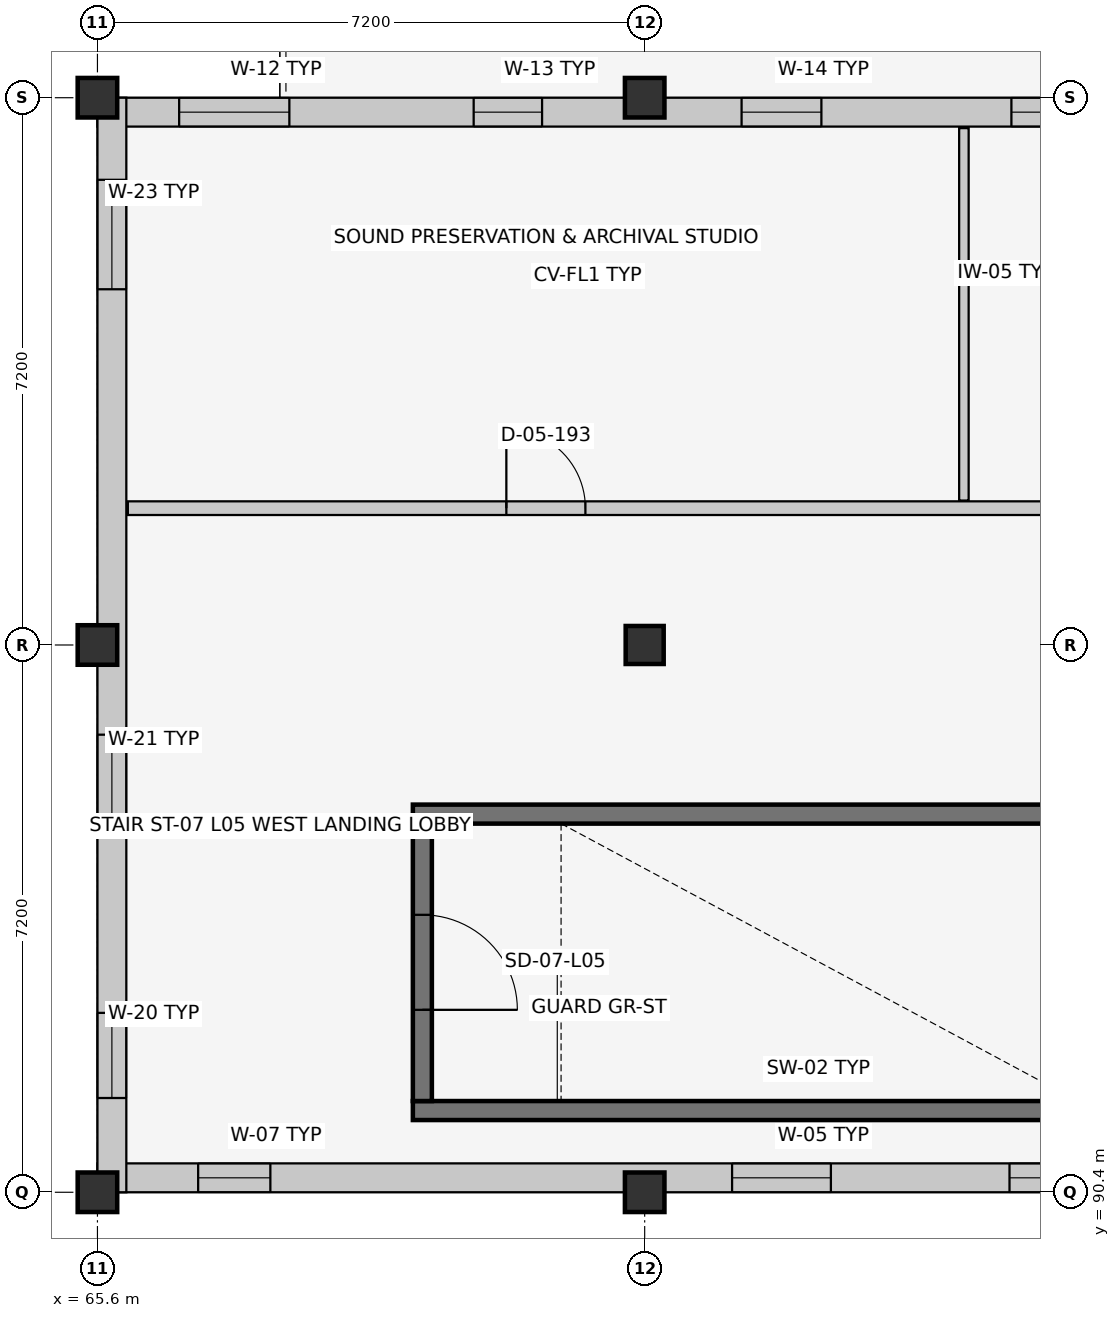
"""IFC4 building model, lengths in metres.
Left out: names, types, materials, properties, quantities, classifications, styles, units other than length and angle.
Written with IfcOpenShell. Run it as: python <this file> out.ifc"""

import sys

from ifc_helpers import new_model, si_unit, direction, frame, frame_2d, origin, origin_2d, place, context, subcontext, project, spatial, rectangle, extrude, element, fill, save


model = new_model("IFC4")
c1 = context("Model", 3, precision=1e-05, world=origin(), true_north=direction((0.0, 1.0)))
c2 = subcontext(c1, "Body", "Model", "MODEL_VIEW")
j1 = project(units=[si_unit("LENGTHUNIT", "METRE"), si_unit("PLANEANGLEUNIT", "RADIAN")], contexts=[c1])
p1 = place(None, origin())
s1 = spatial("IfcSite", under=j1, at=p1, CompositionType="ELEMENT")
p2 = place(p1, origin())
s2 = spatial("IfcBuilding", under=s1, at=p2, CompositionType="ELEMENT")
p3 = place(p2, frame((0.0, 0.0, 21.9)))
s3 = spatial("IfcBuildingStorey", under=s2, at=p3, CompositionType="ELEMENT", Elevation=21.9)
for number, where, z_axis, x_axis in (
    (1, (65.6, 90.4, 0.0), (0.0, 0.0, 1.0), (1.0, 0.0, 0.0)),
    (2, (65.6, 97.6, 0.0), (0.0, 0.0, 1.0), (1.0, 0.0, 0.0)),
    (3, (65.6, 104.8, 0.0), (0.0, 0.0, 1.0), (1.0, 0.0, 0.0)),
    (4, (72.8, 90.4, 0.0), (0.0, 0.0, 1.0), (1.0, 0.0, 0.0)),
):
    element("IfcColumn", number, at=place(p3, frame(where, z_axis=z_axis, x_axis=x_axis)), inside=s3, PredefinedType="COLUMN", context=c2, shape_type="SweptSolid", body=[
        extrude(rectangle(XDim=0.52, YDim=0.52, at=origin_2d()), origin(), (0.0, 0.0, 1.0), 3.9),
    ])
p4 = place(p3, frame((72.8, 97.6, 0.0), z_axis=(0.0, 0.0, 1.0), x_axis=(1.0, 0.0, 0.0)))
e5 = element("IfcColumn", 5, at=p4, inside=s3, PredefinedType="COLUMN", context=c2, shape_type="SweptSolid", body=[
    extrude(rectangle(XDim=0.5, YDim=0.5, at=origin_2d()), origin(), (0.0, 0.0, 1.0), 3.9),
])
p5 = place(p3, frame((72.8, 104.8, 0.0), z_axis=(0.0, 0.0, 1.0), x_axis=(1.0, 0.0, 0.0)))
e6 = element("IfcColumn", 6, at=p5, inside=s3, PredefinedType="COLUMN", context=c2, shape_type="SweptSolid", body=[
    extrude(rectangle(XDim=0.52, YDim=0.52, at=origin_2d()), origin(), (0.0, 0.0, 1.0), 3.9),
])
p6 = place(p3, frame((94.4, 90.59, 0.0), z_axis=(0.0, 0.0, 1.0), x_axis=(-1.0, 0.0, 0.0)))
e7 = element("IfcWall", 7, at=p6, inside=s3, PredefinedType="SOLIDWALL", context=c2, shape_type="SweptSolid", body=[
    extrude(rectangle(XDim=28.8, YDim=0.38, at=frame_2d((14.4, 0.0))), origin(), (0.0, 0.0, 1.0), 2.955),
])
p7 = place(p6, frame((1.05, 0.0, 0.9)))
e8 = element("IfcOpeningElement", 8, at=p7, cuts=e7, PredefinedType="OPENING", context=c2, shape_type="SweptSolid", body=[
    extrude(rectangle(XDim=1.5, YDim=1.75, at=frame_2d((0.75, 0.875))), frame((0.0, 0.202, 0.0), z_axis=(0.0, -1.0, 0.0), x_axis=(1.0, 0.0, 0.0)), (0.0, 0.0, 1.0), 0.404),
])
p8 = place(p6, frame((4.95, 0.0, 0.9)))
e9 = element("IfcOpeningElement", 9, at=p8, cuts=e7, PredefinedType="OPENING", context=c2, shape_type="SweptSolid", body=[
    extrude(rectangle(XDim=0.9, YDim=1.35, at=frame_2d((0.45, 0.675))), frame((0.0, 0.202, 0.0), z_axis=(0.0, -1.0, 0.0), x_axis=(1.0, 0.0, 0.0)), (0.0, 0.0, 1.0), 0.404),
])
p9 = place(p6, frame((8.5, 0.0, 0.9)))
e10 = element("IfcOpeningElement", 10, at=p9, cuts=e7, PredefinedType="OPENING", context=c2, shape_type="SweptSolid", body=[
    extrude(rectangle(XDim=1.0, YDim=1.35, at=frame_2d((0.5, 0.675))), frame((0.0, 0.202, 0.0), z_axis=(0.0, -1.0, 0.0), x_axis=(1.0, 0.0, 0.0)), (0.0, 0.0, 1.0), 0.404),
])
p10 = place(p6, frame((12.05, 0.0, 0.9)))
e11 = element("IfcOpeningElement", 11, at=p10, cuts=e7, PredefinedType="OPENING", context=c2, shape_type="SweptSolid", body=[
    extrude(rectangle(XDim=1.1, YDim=1.35, at=frame_2d((0.55, 0.675))), frame((0.0, 0.202, 0.0), z_axis=(0.0, -1.0, 0.0), x_axis=(1.0, 0.0, 0.0)), (0.0, 0.0, 1.0), 0.404),
])
p11 = place(p6, frame((15.6, 0.0, 0.9)))
e12 = element("IfcOpeningElement", 12, at=p11, cuts=e7, PredefinedType="OPENING", context=c2, shape_type="SweptSolid", body=[
    extrude(rectangle(XDim=1.2, YDim=1.35, at=frame_2d((0.6, 0.675))), frame((0.0, 0.202, 0.0), z_axis=(0.0, -1.0, 0.0), x_axis=(1.0, 0.0, 0.0)), (0.0, 0.0, 1.0), 0.404),
])
p12 = place(p6, frame((19.15, 0.0, 0.9)))
e13 = element("IfcOpeningElement", 13, at=p12, cuts=e7, PredefinedType="OPENING", context=c2, shape_type="SweptSolid", body=[
    extrude(rectangle(XDim=1.3, YDim=1.35, at=frame_2d((0.65, 0.675))), frame((0.0, 0.202, 0.0), z_axis=(0.0, -1.0, 0.0), x_axis=(1.0, 0.0, 0.0)), (0.0, 0.0, 1.0), 0.404),
])
p13 = place(p6, frame((26.525, 0.0, 0.9)))
e14 = element("IfcOpeningElement", 14, at=p13, cuts=e7, PredefinedType="OPENING", context=c2, shape_type="SweptSolid", body=[
    extrude(rectangle(XDim=0.95, YDim=1.45, at=frame_2d((0.475, 0.725))), frame((0.0, 0.202, 0.0), z_axis=(0.0, -1.0, 0.0), x_axis=(1.0, 0.0, 0.0)), (0.0, 0.0, 1.0), 0.404),
])
p14 = place(p3, frame((65.6, 104.61, 0.0), z_axis=(0.0, 0.0, 1.0), x_axis=(1.0, 0.0, 0.0)))
e15 = element("IfcWall", 15, at=p14, inside=s3, PredefinedType="SOLIDWALL", context=c2, shape_type="SweptSolid", body=[
    extrude(rectangle(XDim=28.8, YDim=0.38, at=frame_2d((14.4, 0.0))), origin(), (0.0, 0.0, 1.0), 2.955),
])
p15 = place(p14, frame((17.2, 0.0, 0.0)))
e16 = element("IfcOpeningElement", 16, at=p15, cuts=e15, PredefinedType="OPENING", context=c2, shape_type="SweptSolid", body=[
    extrude(rectangle(XDim=1.6, YDim=2.2, at=frame_2d((0.8, 1.1))), frame((0.0, 0.202, 0.0), z_axis=(0.0, -1.0, 0.0), x_axis=(1.0, 0.0, 0.0)), (0.0, 0.0, 1.0), 0.404),
])
p16 = place(p14, frame((1.075, 0.0, 0.9)))
e17 = element("IfcOpeningElement", 17, at=p16, cuts=e15, PredefinedType="OPENING", context=c2, shape_type="SweptSolid", body=[
    extrude(rectangle(XDim=1.45, YDim=1.45, at=frame_2d((0.725, 0.725))), frame((0.0, 0.202, 0.0), z_axis=(0.0, -1.0, 0.0), x_axis=(1.0, 0.0, 0.0)), (0.0, 0.0, 1.0), 0.404),
])
p17 = place(p14, frame((4.95, 0.0, 0.9)))
e18 = element("IfcOpeningElement", 18, at=p17, cuts=e15, PredefinedType="OPENING", context=c2, shape_type="SweptSolid", body=[
    extrude(rectangle(XDim=0.9, YDim=1.6, at=frame_2d((0.45, 0.8))), frame((0.0, 0.202, 0.0), z_axis=(0.0, -1.0, 0.0), x_axis=(1.0, 0.0, 0.0)), (0.0, 0.0, 1.0), 0.404),
])
p18 = place(p14, frame((8.475, 0.0, 0.9)))
e19 = element("IfcOpeningElement", 19, at=p18, cuts=e15, PredefinedType="OPENING", context=c2, shape_type="SweptSolid", body=[
    extrude(rectangle(XDim=1.05, YDim=1.6, at=frame_2d((0.525, 0.8))), frame((0.0, 0.202, 0.0), z_axis=(0.0, -1.0, 0.0), x_axis=(1.0, 0.0, 0.0)), (0.0, 0.0, 1.0), 0.404),
])
p19 = place(p14, frame((12.025, 0.0, 0.9)))
e20 = element("IfcOpeningElement", 20, at=p19, cuts=e15, PredefinedType="OPENING", context=c2, shape_type="SweptSolid", body=[
    extrude(rectangle(XDim=1.15, YDim=1.6, at=frame_2d((0.575, 0.8))), frame((0.0, 0.202, 0.0), z_axis=(0.0, -1.0, 0.0), x_axis=(1.0, 0.0, 0.0)), (0.0, 0.0, 1.0), 0.404),
])
p20 = place(p14, frame((22.65, 0.0, 0.9)))
e21 = element("IfcOpeningElement", 21, at=p20, cuts=e15, PredefinedType="OPENING", context=c2, shape_type="SweptSolid", body=[
    extrude(rectangle(XDim=1.5, YDim=1.6, at=frame_2d((0.75, 0.8))), frame((0.0, 0.202, 0.0), z_axis=(0.0, -1.0, 0.0), x_axis=(1.0, 0.0, 0.0)), (0.0, 0.0, 1.0), 0.404),
])
p21 = place(p14, frame((26.5, 0.0, 0.9)))
e22 = element("IfcOpeningElement", 22, at=p21, cuts=e15, PredefinedType="OPENING", context=c2, shape_type="SweptSolid", body=[
    extrude(rectangle(XDim=1.0, YDim=1.75, at=frame_2d((0.5, 0.875))), frame((0.0, 0.202, 0.0), z_axis=(0.0, -1.0, 0.0), x_axis=(1.0, 0.0, 0.0)), (0.0, 0.0, 1.0), 0.404),
])
p22 = place(p3, frame((65.79, 90.4, 0.0), z_axis=(0.0, 0.0, 1.0), x_axis=(0.0, 1.0, 0.0)))
e23 = element("IfcWall", 23, at=p22, inside=s3, PredefinedType="SOLIDWALL", context=c2, shape_type="SweptSolid", body=[
    extrude(rectangle(XDim=14.4, YDim=0.38, at=frame_2d((7.2, 0.0))), origin(), (0.0, 0.0, 1.0), 2.915),
])
p23 = place(p22, frame((1.24, 0.0, 0.9)))
e24 = element("IfcOpeningElement", 24, at=p23, cuts=e23, PredefinedType="OPENING", context=c2, shape_type="SweptSolid", body=[
    extrude(rectangle(XDim=1.12, YDim=1.75, at=frame_2d((0.56, 0.875))), frame((0.0, 0.202, 0.0), z_axis=(0.0, -1.0, 0.0), x_axis=(1.0, 0.0, 0.0)), (0.0, 0.0, 1.0), 0.404),
])
p24 = place(p22, frame((4.78, 0.0, 0.9)))
e25 = element("IfcOpeningElement", 25, at=p24, cuts=e23, PredefinedType="OPENING", context=c2, shape_type="SweptSolid", body=[
    extrude(rectangle(XDim=1.24, YDim=1.75, at=frame_2d((0.62, 0.875))), frame((0.0, 0.202, 0.0), z_axis=(0.0, -1.0, 0.0), x_axis=(1.0, 0.0, 0.0)), (0.0, 0.0, 1.0), 0.404),
])
p25 = place(p22, frame((11.88, 0.0, 0.9)))
e26 = element("IfcOpeningElement", 26, at=p25, cuts=e23, PredefinedType="OPENING", context=c2, shape_type="SweptSolid", body=[
    extrude(rectangle(XDim=1.44, YDim=1.75, at=frame_2d((0.72, 0.875))), frame((0.0, 0.202, 0.0), z_axis=(0.0, -1.0, 0.0), x_axis=(1.0, 0.0, 0.0)), (0.0, 0.0, 1.0), 0.404),
])
p26 = place(p3, frame((69.75, 91.475, 0.0), z_axis=(0.0, 0.0, 1.0), x_axis=(1.0, 0.0, 0.0)))
e27 = element("IfcWall", 27, at=p26, inside=s3, PredefinedType="SHEAR", context=c2, shape_type="SweptSolid", body=[
    extrude(rectangle(XDim=9.57, YDim=0.25, at=frame_2d((4.785, 0.0))), origin(), (0.0, 0.0, 1.0), 3.66),
])
p27 = place(p3, frame((78.75, 95.375, 0.0), z_axis=(0.0, 0.0, 1.0), x_axis=(-1.0, 0.0, 0.0)))
e28 = element("IfcWall", 28, at=p27, inside=s3, PredefinedType="SHEAR", context=c2, shape_type="SweptSolid", body=[
    extrude(rectangle(XDim=9.0, YDim=0.25, at=frame_2d((4.5, 0.0))), origin(), (0.0, 0.0, 1.0), 3.66),
])
p28 = place(p3, frame((69.875, 95.25, 0.0), z_axis=(0.0, 0.0, 1.0), x_axis=(0.0, -1.0, 0.0)))
e29 = element("IfcWall", 29, at=p28, inside=s3, PredefinedType="SHEAR", context=c2, shape_type="SweptSolid", body=[
    extrude(rectangle(XDim=3.65, YDim=0.25, at=frame_2d((1.825, 0.0))), origin(), (0.0, 0.0, 1.0), 3.66),
])
p29 = place(p28, frame((1.2, 0.0, 0.0)))
e30 = element("IfcOpeningElement", 30, at=p29, cuts=e29, PredefinedType="OPENING", context=c2, shape_type="SweptSolid", body=[
    extrude(rectangle(XDim=1.25, YDim=2.15, at=frame_2d((0.625, 1.075))), frame((0.0, 0.137, 0.0), z_axis=(0.0, -1.0, 0.0), x_axis=(1.0, 0.0, 0.0)), (0.0, 0.0, 1.0), 0.274),
])
p30 = place(p3, frame((66.0, 99.4, 0.0), z_axis=(0.0, 0.0, 1.0), x_axis=(1.0, 0.0, 0.0)))
e31 = element("IfcWall", 31, at=p30, inside=s3, PredefinedType="PARTITIONING", context=c2, shape_type="SweptSolid", body=[
    extrude(rectangle(XDim=28.0, YDim=0.18, at=frame_2d((14.0, 0.0))), origin(), (0.0, 0.0, 1.0), 3.66),
])
p31 = place(p30, frame((4.98, 0.0, 0.0)))
e32 = element("IfcOpeningElement", 32, at=p31, cuts=e31, PredefinedType="OPENING", context=c2, shape_type="SweptSolid", body=[
    extrude(rectangle(XDim=1.04, YDim=2.15, at=frame_2d((0.52, 1.075))), frame((0.0, 0.102, 0.0), z_axis=(0.0, -1.0, 0.0), x_axis=(1.0, 0.0, 0.0)), (0.0, 0.0, 1.0), 0.204),
])
p32 = place(p30, frame((14.49, 0.0, 0.0)))
e33 = element("IfcOpeningElement", 33, at=p32, cuts=e31, PredefinedType="OPENING", context=c2, shape_type="SweptSolid", body=[
    extrude(rectangle(XDim=1.02, YDim=2.12, at=frame_2d((0.51, 1.06))), frame((0.0, 0.102, 0.0), z_axis=(0.0, -1.0, 0.0), x_axis=(1.0, 0.0, 0.0)), (0.0, 0.0, 1.0), 0.204),
])
p33 = place(p30, frame((23.01, 0.0, 0.0)))
e34 = element("IfcOpeningElement", 34, at=p33, cuts=e31, PredefinedType="OPENING", context=c2, shape_type="SweptSolid", body=[
    extrude(rectangle(XDim=0.98, YDim=2.12, at=frame_2d((0.49, 1.06))), frame((0.0, 0.102, 0.0), z_axis=(0.0, -1.0, 0.0), x_axis=(1.0, 0.0, 0.0)), (0.0, 0.0, 1.0), 0.204),
])
p34 = place(p3, frame((77.0, 99.5, 0.0), z_axis=(0.0, 0.0, 1.0), x_axis=(0.0, 1.0, 0.0)))
e35 = element("IfcWall", 35, at=p34, inside=s3, PredefinedType="PARTITIONING", context=c2, shape_type="SweptSolid", body=[
    extrude(rectangle(XDim=4.9, YDim=0.125, at=frame_2d((2.45, 0.0))), origin(), (0.0, 0.0, 1.0), 3.66),
])
p35 = place(p11, origin())
e36 = element("IfcWindow", 36, at=p35, inside=s3, PartitioningType="SINGLE_PANEL", PredefinedType="WINDOW", context=c2, shape_type="SweptSolid", body=[
    extrude(rectangle(XDim=1.2, YDim=1.35, at=frame_2d((0.6, 0.675))), frame((0.0, 0.03, 0.0), z_axis=(0.0, -1.0, 0.0), x_axis=(1.0, 0.0, 0.0)), (0.0, 0.0, 1.0), 0.06),
])
fill(e12, e36)
p36 = place(p12, origin())
e37 = element("IfcWindow", 37, at=p36, inside=s3, PartitioningType="SINGLE_PANEL", PredefinedType="WINDOW", context=c2, shape_type="SweptSolid", body=[
    extrude(rectangle(XDim=1.3, YDim=1.35, at=frame_2d((0.65, 0.675))), frame((0.0, 0.03, 0.0), z_axis=(0.0, -1.0, 0.0), x_axis=(1.0, 0.0, 0.0)), (0.0, 0.0, 1.0), 0.06),
])
fill(e13, e37)
p37 = place(p13, origin())
e38 = element("IfcWindow", 38, at=p37, inside=s3, PartitioningType="SINGLE_PANEL", PredefinedType="WINDOW", context=c2, shape_type="SweptSolid", body=[
    extrude(rectangle(XDim=0.95, YDim=1.45, at=frame_2d((0.475, 0.725))), frame((0.0, 0.03, 0.0), z_axis=(0.0, -1.0, 0.0), x_axis=(1.0, 0.0, 0.0)), (0.0, 0.0, 1.0), 0.06),
])
fill(e14, e38)
p38 = place(p16, origin())
e39 = element("IfcWindow", 39, at=p38, inside=s3, PartitioningType="SINGLE_PANEL", PredefinedType="WINDOW", context=c2, shape_type="SweptSolid", body=[
    extrude(rectangle(XDim=1.45, YDim=1.45, at=frame_2d((0.725, 0.725))), frame((0.0, 0.03, 0.0), z_axis=(0.0, -1.0, 0.0), x_axis=(1.0, 0.0, 0.0)), (0.0, 0.0, 1.0), 0.06),
])
fill(e17, e39)
p39 = place(p17, origin())
e40 = element("IfcWindow", 40, at=p39, inside=s3, PartitioningType="SINGLE_PANEL", PredefinedType="WINDOW", context=c2, shape_type="SweptSolid", body=[
    extrude(rectangle(XDim=0.9, YDim=1.6, at=frame_2d((0.45, 0.8))), frame((0.0, 0.03, 0.0), z_axis=(0.0, -1.0, 0.0), x_axis=(1.0, 0.0, 0.0)), (0.0, 0.0, 1.0), 0.06),
])
fill(e18, e40)
p40 = place(p18, origin())
e41 = element("IfcWindow", 41, at=p40, inside=s3, PartitioningType="SINGLE_PANEL", PredefinedType="WINDOW", context=c2, shape_type="SweptSolid", body=[
    extrude(rectangle(XDim=1.05, YDim=1.6, at=frame_2d((0.525, 0.8))), frame((0.0, 0.03, 0.0), z_axis=(0.0, -1.0, 0.0), x_axis=(1.0, 0.0, 0.0)), (0.0, 0.0, 1.0), 0.06),
])
fill(e19, e41)
p41 = place(p19, origin())
e42 = element("IfcWindow", 42, at=p41, inside=s3, PartitioningType="SINGLE_PANEL", PredefinedType="WINDOW", context=c2, shape_type="SweptSolid", body=[
    extrude(rectangle(XDim=1.15, YDim=1.6, at=frame_2d((0.575, 0.8))), frame((0.0, 0.03, 0.0), z_axis=(0.0, -1.0, 0.0), x_axis=(1.0, 0.0, 0.0)), (0.0, 0.0, 1.0), 0.06),
])
fill(e20, e42)
p42 = place(p23, origin())
e43 = element("IfcWindow", 43, at=p42, inside=s3, PartitioningType="SINGLE_PANEL", PredefinedType="WINDOW", context=c2, shape_type="SweptSolid", body=[
    extrude(rectangle(XDim=1.12, YDim=1.75, at=frame_2d((0.56, 0.875))), frame((0.0, 0.03, 0.0), z_axis=(0.0, -1.0, 0.0), x_axis=(1.0, 0.0, 0.0)), (0.0, 0.0, 1.0), 0.06),
])
fill(e24, e43)
p43 = place(p24, origin())
e44 = element("IfcWindow", 44, at=p43, inside=s3, PartitioningType="SINGLE_PANEL", PredefinedType="WINDOW", context=c2, shape_type="SweptSolid", body=[
    extrude(rectangle(XDim=1.24, YDim=1.75, at=frame_2d((0.62, 0.875))), frame((0.0, 0.03, 0.0), z_axis=(0.0, -1.0, 0.0), x_axis=(1.0, 0.0, 0.0)), (0.0, 0.0, 1.0), 0.06),
])
fill(e25, e44)
p44 = place(p25, origin())
e45 = element("IfcWindow", 45, at=p44, inside=s3, PartitioningType="SINGLE_PANEL", PredefinedType="WINDOW", context=c2, shape_type="SweptSolid", body=[
    extrude(rectangle(XDim=1.44, YDim=1.75, at=frame_2d((0.72, 0.875))), frame((0.0, 0.03, 0.0), z_axis=(0.0, -1.0, 0.0), x_axis=(1.0, 0.0, 0.0)), (0.0, 0.0, 1.0), 0.06),
])
fill(e26, e45)
p45 = place(p29, origin())
e46 = element("IfcDoor", 46, at=p45, inside=s3, OperationType="SINGLE_SWING_RIGHT", PredefinedType="DOOR", context=c2, shape_type="SweptSolid", body=[
    extrude(rectangle(XDim=1.25, YDim=2.15, at=frame_2d((0.625, 1.075))), frame((0.0, 0.025, 0.0), z_axis=(0.0, -1.0, 0.0), x_axis=(1.0, 0.0, 0.0)), (0.0, 0.0, 1.0), 0.05),
])
fill(e30, e46)
p46 = place(p31, origin())
e47 = element("IfcDoor", 47, at=p46, inside=s3, OperationType="SINGLE_SWING_LEFT", PredefinedType="DOOR", context=c2, shape_type="SweptSolid", body=[
    extrude(rectangle(XDim=1.04, YDim=2.15, at=frame_2d((0.52, 1.075))), frame((0.0, 0.025, 0.0), z_axis=(0.0, -1.0, 0.0), x_axis=(1.0, 0.0, 0.0)), (0.0, 0.0, 1.0), 0.05),
])
fill(e32, e47)
save(model, sys.argv[1])
